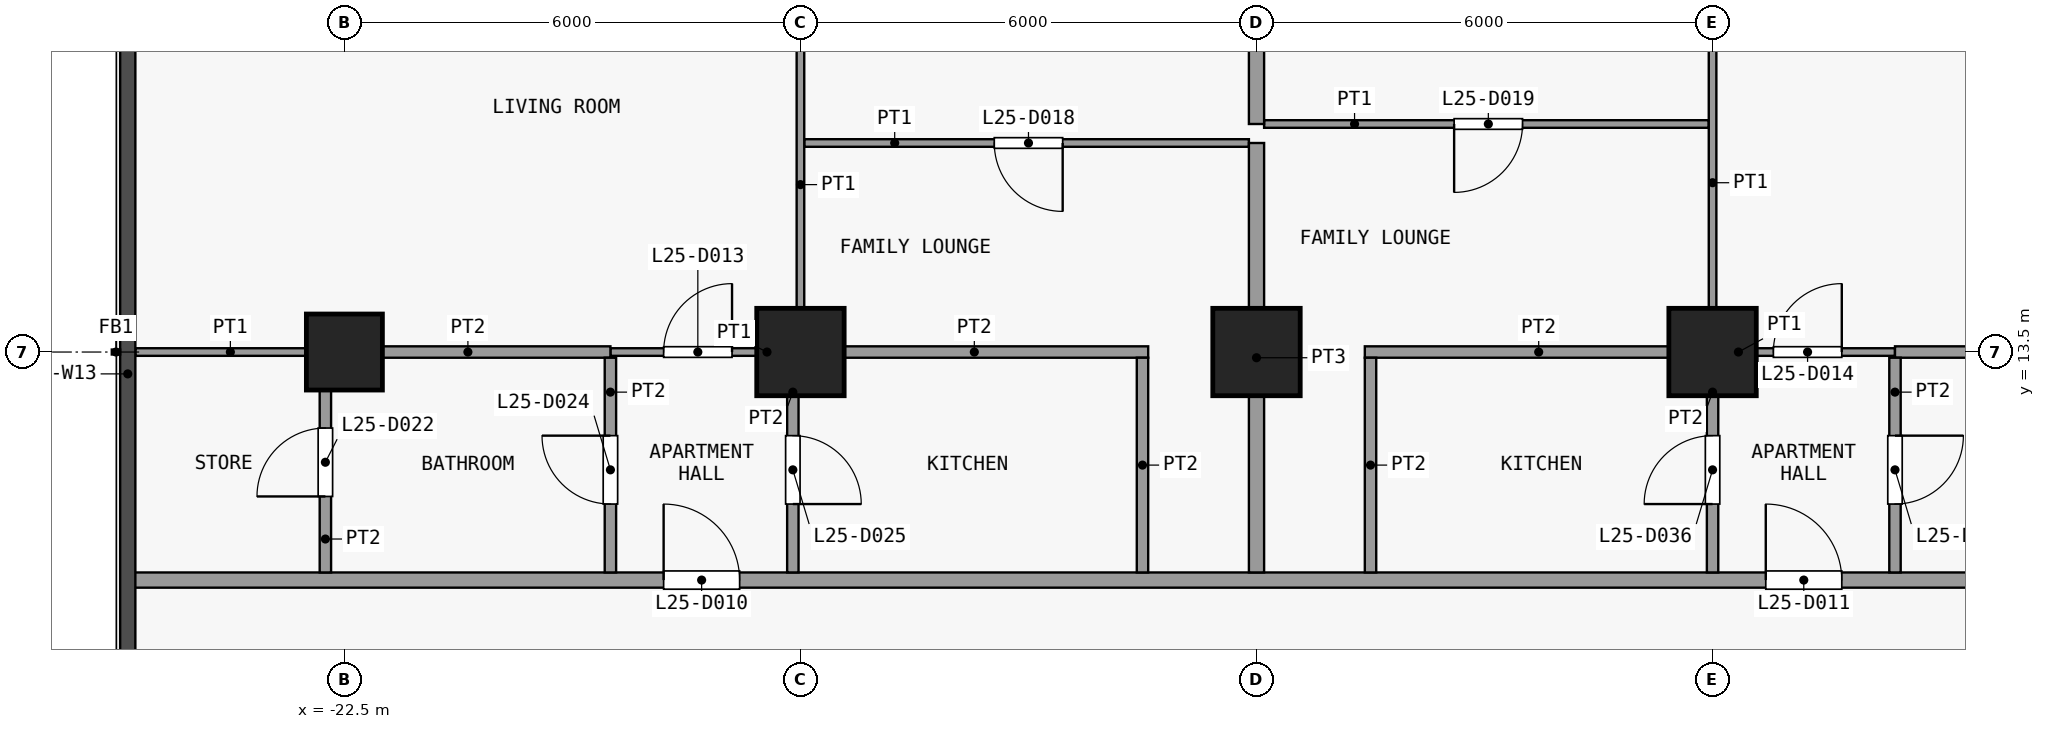
"""IFC4 building model, lengths in metres.
Left out: names, types, materials, properties, quantities, classifications, styles, units other than length and angle.
Written with IfcOpenShell. Run it as: python <this file> out.ifc"""

import sys

from ifc_helpers import new_model, si_unit, direction, frame, frame_2d, origin, origin_2d, place, context, subcontext, project, spatial, rectangle, extrude, element, fill, save


model = new_model("IFC4")
c1 = context("Model", 3, precision=1e-05, world=origin(), true_north=direction((0.0, 1.0)))
c2 = subcontext(c1, "Body", "Model", "MODEL_VIEW")
j1 = project(units=[si_unit("LENGTHUNIT", "METRE"), si_unit("PLANEANGLEUNIT", "RADIAN")], contexts=[c1])
p1 = place(None, origin())
s1 = spatial("IfcSite", under=j1, at=p1, CompositionType="ELEMENT")
p2 = place(p1, origin())
s2 = spatial("IfcBuilding", under=s1, at=p2, CompositionType="ELEMENT")
p3 = place(p2, frame((0.0, 0.0, 102.7)))
s3 = spatial("IfcBuildingStorey", under=s2, at=p3, CompositionType="ELEMENT", Elevation=102.7)
p4 = place(p3, frame((-22.5, 13.5, 0.0), z_axis=(0.0, 0.0, 1.0), x_axis=(1.0, 0.0, 0.0)))
e1 = element("IfcColumn", 1, at=p4, inside=s3, PredefinedType="COLUMN", context=c2, shape_type="SweptSolid", body=[
    extrude(rectangle(XDim=1.0, YDim=1.0, at=origin_2d()), origin(), (0.0, 0.0, 1.0), 3.6),
])
for number, where, z_axis, x_axis in (
    (2, (-16.5, 13.5, 0.0), (0.0, 0.0, 1.0), (1.0, 0.0, 0.0)),
    (3, (-10.5, 13.5, 0.0), (0.0, 0.0, 1.0), (1.0, 0.0, 0.0)),
    (4, (-4.5, 13.5, 0.0), (0.0, 0.0, 1.0), (1.0, 0.0, 0.0)),
):
    element("IfcColumn", number, at=place(p3, frame(where, z_axis=z_axis, x_axis=x_axis)), inside=s3, PredefinedType="COLUMN", context=c2, shape_type="SweptSolid", body=[
        extrude(rectangle(XDim=1.15, YDim=1.15, at=origin_2d()), origin(), (0.0, 0.0, 1.0), 3.6),
    ])
p5 = place(p3, frame((-25.35, 10.5, 0.0), z_axis=(0.0, 0.0, 1.0), x_axis=(1.0, 0.0, 0.0)))
e5 = element("IfcWall", 5, at=p5, inside=s3, PredefinedType="PARTITIONING", context=c2, shape_type="SweptSolid", body=[
    extrude(rectangle(XDim=50.7, YDim=0.2, at=frame_2d((25.35, 0.0))), origin(), (0.0, 0.0, 1.0), 3.3),
])
p6 = place(p5, frame((7.05, 0.0, 0.0)))
e6 = element("IfcOpeningElement", 6, at=p6, cuts=e5, PredefinedType="OPENING", context=c2, shape_type="SweptSolid", body=[
    extrude(rectangle(XDim=1.0, YDim=2.1, at=frame_2d((0.5, 1.05))), frame((0.0, 0.11, 0.0), z_axis=(0.0, -1.0, 0.0), x_axis=(1.0, 0.0, 0.0)), (0.0, 0.0, 1.0), 0.22),
])
p7 = place(p5, frame((21.55, 0.0, 0.0)))
e7 = element("IfcOpeningElement", 7, at=p7, cuts=e5, PredefinedType="OPENING", context=c2, shape_type="SweptSolid", body=[
    extrude(rectangle(XDim=1.0, YDim=2.1, at=frame_2d((0.5, 1.05))), frame((0.0, 0.11, 0.0), z_axis=(0.0, -1.0, 0.0), x_axis=(1.0, 0.0, 0.0)), (0.0, 0.0, 1.0), 0.22),
])
p8 = place(p5, frame((45.05, 0.0, 0.0)))
e8 = element("IfcOpeningElement", 8, at=p8, cuts=e5, PredefinedType="OPENING", context=c2, shape_type="SweptSolid", body=[
    extrude(rectangle(XDim=1.0, YDim=2.1, at=frame_2d((0.5, 1.05))), frame((0.0, 0.11, 0.0), z_axis=(0.0, -1.0, 0.0), x_axis=(1.0, 0.0, 0.0)), (0.0, 0.0, 1.0), 0.22),
])
p9 = place(p3, frame((-25.25, 13.5, 0.0), z_axis=(0.0, 0.0, 1.0), x_axis=(1.0, 0.0, 0.0)))
e9 = element("IfcWall", 9, at=p9, inside=s3, PredefinedType="PARTITIONING", context=c2, shape_type="SweptSolid", body=[
    extrude(rectangle(XDim=2.5, YDim=0.1, at=frame_2d((1.25, 0.0))), origin(), (0.0, 0.0, 1.0), 3.3),
])
p10 = place(p3, frame((-19.0, 13.5, 0.0), z_axis=(0.0, 0.0, 1.0), x_axis=(1.0, 0.0, 0.0)))
e10 = element("IfcWall", 10, at=p10, inside=s3, PredefinedType="PARTITIONING", context=c2, shape_type="SweptSolid", body=[
    extrude(rectangle(XDim=2.4, YDim=0.1, at=frame_2d((1.2, 0.0))), origin(), (0.0, 0.0, 1.0), 3.3),
])
p11 = place(p10, frame((0.7, 0.0, 0.0)))
e11 = element("IfcOpeningElement", 11, at=p11, cuts=e10, PredefinedType="OPENING", context=c2, shape_type="SweptSolid", body=[
    extrude(rectangle(XDim=0.9, YDim=2.1, at=frame_2d((0.45, 1.05))), frame((0.0, 0.06, 0.0), z_axis=(0.0, -1.0, 0.0), x_axis=(1.0, 0.0, 0.0)), (0.0, 0.0, 1.0), 0.12),
])
p12 = place(p3, frame((-4.5, 13.5, 0.0), z_axis=(0.0, 0.0, 1.0), x_axis=(1.0, 0.0, 0.0)))
e12 = element("IfcWall", 12, at=p12, inside=s3, PredefinedType="PARTITIONING", context=c2, shape_type="SweptSolid", body=[
    extrude(rectangle(XDim=2.4, YDim=0.1, at=frame_2d((1.2, 0.0))), origin(), (0.0, 0.0, 1.0), 3.3),
])
p13 = place(p12, frame((0.8, 0.0, 0.0)))
e13 = element("IfcOpeningElement", 13, at=p13, cuts=e12, PredefinedType="OPENING", context=c2, shape_type="SweptSolid", body=[
    extrude(rectangle(XDim=0.9, YDim=2.1, at=frame_2d((0.45, 1.05))), frame((0.0, 0.06, 0.0), z_axis=(0.0, -1.0, 0.0), x_axis=(1.0, 0.0, 0.0)), (0.0, 0.0, 1.0), 0.12),
])
p14 = place(p3, frame((-22.75, 13.5, 0.0), z_axis=(0.0, 0.0, 1.0), x_axis=(1.0, 0.0, 0.0)))
e14 = element("IfcWall", 14, at=p14, inside=s3, PredefinedType="PARTITIONING", context=c2, shape_type="SweptSolid", body=[
    extrude(rectangle(XDim=3.75, YDim=0.15, at=frame_2d((1.875, 0.0))), origin(), (0.0, 0.0, 1.0), 3.3),
])
for number, where, z_axis, x_axis in (
    (15, (-16.5, 13.5, 0.0), (0.0, 0.0, 1.0), (1.0, 0.0, 0.0)),
    (16, (-9.075, 13.5, 0.0), (0.0, 0.0, 1.0), (1.0, 0.0, 0.0)),
):
    element("IfcWall", number, at=place(p3, frame(where, z_axis=z_axis, x_axis=x_axis)), inside=s3, PredefinedType="PARTITIONING", context=c2, shape_type="SweptSolid", body=[
        extrude(rectangle(XDim=4.575, YDim=0.15, at=frame_2d((2.288, 0.0))), origin(), (0.0, 0.0, 1.0), 3.3),
    ])
p15 = place(p3, frame((-2.1, 13.5, 0.0), z_axis=(0.0, 0.0, 1.0), x_axis=(1.0, 0.0, 0.0)))
e17 = element("IfcWall", 17, at=p15, inside=s3, PredefinedType="PARTITIONING", context=c2, shape_type="SweptSolid", body=[
    extrude(rectangle(XDim=21.1, YDim=0.15, at=frame_2d((10.55, 0.0))), origin(), (0.0, 0.0, 1.0), 3.3),
])
p16 = place(p15, frame((15.1, 0.0, 0.0)))
e18 = element("IfcOpeningElement", 18, at=p16, cuts=e17, PredefinedType="OPENING", context=c2, shape_type="SweptSolid", body=[
    extrude(rectangle(XDim=0.9, YDim=2.1, at=frame_2d((0.45, 1.05))), frame((0.0, 0.085, 0.0), z_axis=(0.0, -1.0, 0.0), x_axis=(1.0, 0.0, 0.0)), (0.0, 0.0, 1.0), 0.17),
])
p17 = place(p3, frame((-16.45, 16.25, 0.0), z_axis=(0.0, 0.0, 1.0), x_axis=(1.0, 0.0, 0.0)))
e19 = element("IfcWall", 19, at=p17, inside=s3, PredefinedType="PARTITIONING", context=c2, shape_type="SweptSolid", body=[
    extrude(rectangle(XDim=5.85, YDim=0.1, at=frame_2d((2.925, 0.0))), origin(), (0.0, 0.0, 1.0), 3.3),
])
p18 = place(p17, frame((2.5, 0.0, 0.0)))
e20 = element("IfcOpeningElement", 20, at=p18, cuts=e19, PredefinedType="OPENING", context=c2, shape_type="SweptSolid", body=[
    extrude(rectangle(XDim=0.9, YDim=2.1, at=frame_2d((0.45, 1.05))), frame((0.0, 0.06, 0.0), z_axis=(0.0, -1.0, 0.0), x_axis=(1.0, 0.0, 0.0)), (0.0, 0.0, 1.0), 0.12),
])
p19 = place(p3, frame((-10.4, 16.5, 0.0), z_axis=(0.0, 0.0, 1.0), x_axis=(1.0, 0.0, 0.0)))
e21 = element("IfcWall", 21, at=p19, inside=s3, PredefinedType="PARTITIONING", context=c2, shape_type="SweptSolid", body=[
    extrude(rectangle(XDim=5.85, YDim=0.1, at=frame_2d((2.925, 0.0))), origin(), (0.0, 0.0, 1.0), 3.3),
])
p20 = place(p19, frame((2.5, 0.0, 0.0)))
e22 = element("IfcOpeningElement", 22, at=p20, cuts=e21, PredefinedType="OPENING", context=c2, shape_type="SweptSolid", body=[
    extrude(rectangle(XDim=0.9, YDim=2.1, at=frame_2d((0.45, 1.05))), frame((0.0, 0.06, 0.0), z_axis=(0.0, -1.0, 0.0), x_axis=(1.0, 0.0, 0.0)), (0.0, 0.0, 1.0), 0.12),
])
p21 = place(p3, frame((-22.75, 10.6, 0.0), z_axis=(0.0, 0.0, 1.0), x_axis=(0.0, 1.0, 0.0)))
e23 = element("IfcWall", 23, at=p21, inside=s3, PredefinedType="PARTITIONING", context=c2, shape_type="SweptSolid", body=[
    extrude(rectangle(XDim=2.825, YDim=0.15, at=frame_2d((1.413, 0.0))), origin(), (0.0, 0.0, 1.0), 3.3),
])
p22 = place(p21, frame((1.0, 0.0, 0.0)))
e24 = element("IfcOpeningElement", 24, at=p22, cuts=e23, PredefinedType="OPENING", context=c2, shape_type="SweptSolid", body=[
    extrude(rectangle(XDim=0.9, YDim=2.1, at=frame_2d((0.45, 1.05))), frame((0.0, 0.085, 0.0), z_axis=(0.0, -1.0, 0.0), x_axis=(1.0, 0.0, 0.0)), (0.0, 0.0, 1.0), 0.17),
])
p23 = place(p3, frame((-19.0, 10.6, 0.0), z_axis=(0.0, 0.0, 1.0), x_axis=(0.0, 1.0, 0.0)))
e25 = element("IfcWall", 25, at=p23, inside=s3, PredefinedType="PARTITIONING", context=c2, shape_type="SweptSolid", body=[
    extrude(rectangle(XDim=2.825, YDim=0.15, at=frame_2d((1.413, 0.0))), origin(), (0.0, 0.0, 1.0), 3.3),
])
p24 = place(p23, frame((0.9, 0.0, 0.0)))
e26 = element("IfcOpeningElement", 26, at=p24, cuts=e25, PredefinedType="OPENING", context=c2, shape_type="SweptSolid", body=[
    extrude(rectangle(XDim=0.9, YDim=2.1, at=frame_2d((0.45, 1.05))), frame((0.0, 0.085, 0.0), z_axis=(0.0, -1.0, 0.0), x_axis=(1.0, 0.0, 0.0)), (0.0, 0.0, 1.0), 0.17),
])
p25 = place(p3, frame((-16.6, 10.6, 0.0), z_axis=(0.0, 0.0, 1.0), x_axis=(0.0, 1.0, 0.0)))
e27 = element("IfcWall", 27, at=p25, inside=s3, PredefinedType="PARTITIONING", context=c2, shape_type="SweptSolid", body=[
    extrude(rectangle(XDim=2.825, YDim=0.15, at=frame_2d((1.413, 0.0))), origin(), (0.0, 0.0, 1.0), 3.3),
])
p26 = place(p25, frame((0.9, 0.0, 0.0)))
e28 = element("IfcOpeningElement", 28, at=p26, cuts=e27, PredefinedType="OPENING", context=c2, shape_type="SweptSolid", body=[
    extrude(rectangle(XDim=0.9, YDim=2.1, at=frame_2d((0.45, 1.05))), frame((0.0, 0.085, 0.0), z_axis=(0.0, -1.0, 0.0), x_axis=(1.0, 0.0, 0.0)), (0.0, 0.0, 1.0), 0.17),
])
p27 = place(p3, frame((-16.5, 13.575, 0.0), z_axis=(0.0, 0.0, 1.0), x_axis=(0.0, 1.0, 0.0)))
e29 = element("IfcWall", 29, at=p27, inside=s3, PredefinedType="PARTITIONING", context=c2, shape_type="SweptSolid", body=[
    extrude(rectangle(XDim=8.675, YDim=0.1, at=frame_2d((4.337, 0.0))), origin(), (0.0, 0.0, 1.0), 3.3),
])
p28 = place(p27, frame((4.375, 0.0, 0.0)))
e30 = element("IfcOpeningElement", 30, at=p28, cuts=e29, PredefinedType="OPENING", context=c2, shape_type="SweptSolid", body=[
    extrude(rectangle(XDim=0.9, YDim=2.1, at=frame_2d((0.45, 1.05))), frame((0.0, 0.06, 0.0), z_axis=(0.0, -1.0, 0.0), x_axis=(1.0, 0.0, 0.0)), (0.0, 0.0, 1.0), 0.12),
])
p29 = place(p3, frame((-12.0, 10.6, 0.0), z_axis=(0.0, 0.0, 1.0), x_axis=(0.0, 1.0, 0.0)))
e31 = element("IfcWall", 31, at=p29, inside=s3, PredefinedType="PARTITIONING", context=c2, shape_type="SweptSolid", body=[
    extrude(rectangle(XDim=2.825, YDim=0.15, at=frame_2d((1.413, 0.0))), origin(), (0.0, 0.0, 1.0), 3.3),
])
p30 = place(p3, frame((-10.5, 10.6, 0.0), z_axis=(0.0, 0.0, 1.0), x_axis=(0.0, 1.0, 0.0)))
e32 = element("IfcWall", 32, at=p30, inside=s3, PredefinedType="PARTITIONING", context=c2, shape_type="SweptSolid", body=[
    extrude(rectangle(XDim=5.65, YDim=0.2, at=frame_2d((2.825, 0.0))), origin(), (0.0, 0.0, 1.0), 3.3),
])
p31 = place(p3, frame((-10.5, 16.5, 0.0), z_axis=(0.0, 0.0, 1.0), x_axis=(0.0, 1.0, 0.0)))
e33 = element("IfcWall", 33, at=p31, inside=s3, PredefinedType="PARTITIONING", context=c2, shape_type="SweptSolid", body=[
    extrude(rectangle(XDim=5.75, YDim=0.2, at=frame_2d((2.875, 0.0))), origin(), (0.0, 0.0, 1.0), 3.3),
])
p32 = place(p3, frame((-9.0, 10.6, 0.0), z_axis=(0.0, 0.0, 1.0), x_axis=(0.0, 1.0, 0.0)))
e34 = element("IfcWall", 34, at=p32, inside=s3, PredefinedType="PARTITIONING", context=c2, shape_type="SweptSolid", body=[
    extrude(rectangle(XDim=2.825, YDim=0.15, at=frame_2d((1.413, 0.0))), origin(), (0.0, 0.0, 1.0), 3.3),
])
p33 = place(p3, frame((-4.5, 13.575, 0.0), z_axis=(0.0, 0.0, 1.0), x_axis=(0.0, 1.0, 0.0)))
e35 = element("IfcWall", 35, at=p33, inside=s3, PredefinedType="PARTITIONING", context=c2, shape_type="SweptSolid", body=[
    extrude(rectangle(XDim=8.675, YDim=0.1, at=frame_2d((4.337, 0.0))), origin(), (0.0, 0.0, 1.0), 3.3),
])
p34 = place(p33, frame((4.425, 0.0, 0.0)))
e36 = element("IfcOpeningElement", 36, at=p34, cuts=e35, PredefinedType="OPENING", context=c2, shape_type="SweptSolid", body=[
    extrude(rectangle(XDim=0.9, YDim=2.1, at=frame_2d((0.45, 1.05))), frame((0.0, 0.06, 0.0), z_axis=(0.0, -1.0, 0.0), x_axis=(1.0, 0.0, 0.0)), (0.0, 0.0, 1.0), 0.12),
])
p35 = place(p3, frame((-4.5, 10.6, 0.0), z_axis=(0.0, 0.0, 1.0), x_axis=(0.0, 1.0, 0.0)))
e37 = element("IfcWall", 37, at=p35, inside=s3, PredefinedType="PARTITIONING", context=c2, shape_type="SweptSolid", body=[
    extrude(rectangle(XDim=2.825, YDim=0.15, at=frame_2d((1.413, 0.0))), origin(), (0.0, 0.0, 1.0), 3.3),
])
p36 = place(p35, frame((0.9, 0.0, 0.0)))
e38 = element("IfcOpeningElement", 38, at=p36, cuts=e37, PredefinedType="OPENING", context=c2, shape_type="SweptSolid", body=[
    extrude(rectangle(XDim=0.9, YDim=2.1, at=frame_2d((0.45, 1.05))), frame((0.0, 0.085, 0.0), z_axis=(0.0, -1.0, 0.0), x_axis=(1.0, 0.0, 0.0)), (0.0, 0.0, 1.0), 0.17),
])
p37 = place(p3, frame((-2.1, 10.6, 0.0), z_axis=(0.0, 0.0, 1.0), x_axis=(0.0, 1.0, 0.0)))
e39 = element("IfcWall", 39, at=p37, inside=s3, PredefinedType="PARTITIONING", context=c2, shape_type="SweptSolid", body=[
    extrude(rectangle(XDim=2.825, YDim=0.15, at=frame_2d((1.413, 0.0))), origin(), (0.0, 0.0, 1.0), 3.3),
])
p38 = place(p37, frame((0.9, 0.0, 0.0)))
e40 = element("IfcOpeningElement", 40, at=p38, cuts=e39, PredefinedType="OPENING", context=c2, shape_type="SweptSolid", body=[
    extrude(rectangle(XDim=0.9, YDim=2.1, at=frame_2d((0.45, 1.05))), frame((0.0, 0.085, 0.0), z_axis=(0.0, -1.0, 0.0), x_axis=(1.0, 0.0, 0.0)), (0.0, 0.0, 1.0), 0.17),
])
p39 = place(p6, origin())
e41 = element("IfcDoor", 41, at=p39, inside=s3, OperationType="SINGLE_SWING_RIGHT", PredefinedType="DOOR", context=c2, shape_type="SweptSolid", body=[
    extrude(rectangle(XDim=1.0, YDim=2.1, at=frame_2d((0.5, 1.05))), frame((0.0, 0.025, 0.0), z_axis=(0.0, -1.0, 0.0), x_axis=(1.0, 0.0, 0.0)), (0.0, 0.0, 1.0), 0.05),
])
fill(e6, e41)
p40 = place(p7, origin())
e42 = element("IfcDoor", 42, at=p40, inside=s3, OperationType="SINGLE_SWING_RIGHT", PredefinedType="DOOR", context=c2, shape_type="SweptSolid", body=[
    extrude(rectangle(XDim=1.0, YDim=2.1, at=frame_2d((0.5, 1.05))), frame((0.0, 0.025, 0.0), z_axis=(0.0, -1.0, 0.0), x_axis=(1.0, 0.0, 0.0)), (0.0, 0.0, 1.0), 0.05),
])
fill(e7, e42)
p41 = place(p11, origin())
e43 = element("IfcDoor", 43, at=p41, inside=s3, OperationType="SINGLE_SWING_LEFT", PredefinedType="DOOR", context=c2, shape_type="SweptSolid", body=[
    extrude(rectangle(XDim=0.9, YDim=2.1, at=frame_2d((0.45, 1.05))), frame((0.0, 0.025, 0.0), z_axis=(0.0, -1.0, 0.0), x_axis=(1.0, 0.0, 0.0)), (0.0, 0.0, 1.0), 0.05),
])
fill(e11, e43)
p42 = place(p13, origin())
e44 = element("IfcDoor", 44, at=p42, inside=s3, OperationType="SINGLE_SWING_LEFT", PredefinedType="DOOR", context=c2, shape_type="SweptSolid", body=[
    extrude(rectangle(XDim=0.9, YDim=2.1, at=frame_2d((0.45, 1.05))), frame((0.0, 0.025, 0.0), z_axis=(0.0, -1.0, 0.0), x_axis=(1.0, 0.0, 0.0)), (0.0, 0.0, 1.0), 0.05),
])
fill(e13, e44)
p43 = place(p18, origin())
e45 = element("IfcDoor", 45, at=p43, inside=s3, OperationType="SINGLE_SWING_RIGHT", PredefinedType="DOOR", context=c2, shape_type="SweptSolid", body=[
    extrude(rectangle(XDim=0.9, YDim=2.1, at=frame_2d((0.45, 1.05))), frame((0.0, 0.025, 0.0), z_axis=(0.0, -1.0, 0.0), x_axis=(1.0, 0.0, 0.0)), (0.0, 0.0, 1.0), 0.05),
])
fill(e20, e45)
p44 = place(p20, origin())
e46 = element("IfcDoor", 46, at=p44, inside=s3, OperationType="SINGLE_SWING_LEFT", PredefinedType="DOOR", context=c2, shape_type="SweptSolid", body=[
    extrude(rectangle(XDim=0.9, YDim=2.1, at=frame_2d((0.45, 1.05))), frame((0.0, 0.025, 0.0), z_axis=(0.0, -1.0, 0.0), x_axis=(1.0, 0.0, 0.0)), (0.0, 0.0, 1.0), 0.05),
])
fill(e22, e46)
p45 = place(p22, origin())
e47 = element("IfcDoor", 47, at=p45, inside=s3, OperationType="SINGLE_SWING_RIGHT", PredefinedType="DOOR", context=c2, shape_type="SweptSolid", body=[
    extrude(rectangle(XDim=0.9, YDim=2.1, at=frame_2d((0.45, 1.05))), frame((0.0, 0.025, 0.0), z_axis=(0.0, -1.0, 0.0), x_axis=(1.0, 0.0, 0.0)), (0.0, 0.0, 1.0), 0.05),
])
fill(e24, e47)
p46 = place(p24, origin())
e48 = element("IfcDoor", 48, at=p46, inside=s3, OperationType="SINGLE_SWING_LEFT", PredefinedType="DOOR", context=c2, shape_type="SweptSolid", body=[
    extrude(rectangle(XDim=0.9, YDim=2.1, at=frame_2d((0.45, 1.05))), frame((0.0, 0.025, 0.0), z_axis=(0.0, -1.0, 0.0), x_axis=(1.0, 0.0, 0.0)), (0.0, 0.0, 1.0), 0.05),
])
fill(e26, e48)
p47 = place(p26, origin())
e49 = element("IfcDoor", 49, at=p47, inside=s3, OperationType="SINGLE_SWING_LEFT", PredefinedType="DOOR", context=c2, shape_type="SweptSolid", body=[
    extrude(rectangle(XDim=0.9, YDim=2.1, at=frame_2d((0.45, 1.05))), frame((0.0, 0.025, 0.0), z_axis=(0.0, -1.0, 0.0), x_axis=(1.0, 0.0, 0.0)), (0.0, 0.0, 1.0), 0.05),
])
fill(e28, e49)
p48 = place(p36, origin())
e50 = element("IfcDoor", 50, at=p48, inside=s3, OperationType="SINGLE_SWING_RIGHT", PredefinedType="DOOR", context=c2, shape_type="SweptSolid", body=[
    extrude(rectangle(XDim=0.9, YDim=2.1, at=frame_2d((0.45, 1.05))), frame((0.0, 0.025, 0.0), z_axis=(0.0, -1.0, 0.0), x_axis=(1.0, 0.0, 0.0)), (0.0, 0.0, 1.0), 0.05),
])
fill(e38, e50)
p49 = place(p38, origin())
e51 = element("IfcDoor", 51, at=p49, inside=s3, OperationType="SINGLE_SWING_RIGHT", PredefinedType="DOOR", context=c2, shape_type="SweptSolid", body=[
    extrude(rectangle(XDim=0.9, YDim=2.1, at=frame_2d((0.45, 1.05))), frame((0.0, 0.025, 0.0), z_axis=(0.0, -1.0, 0.0), x_axis=(1.0, 0.0, 0.0)), (0.0, 0.0, 1.0), 0.05),
])
fill(e40, e51)
save(model, sys.argv[1])
